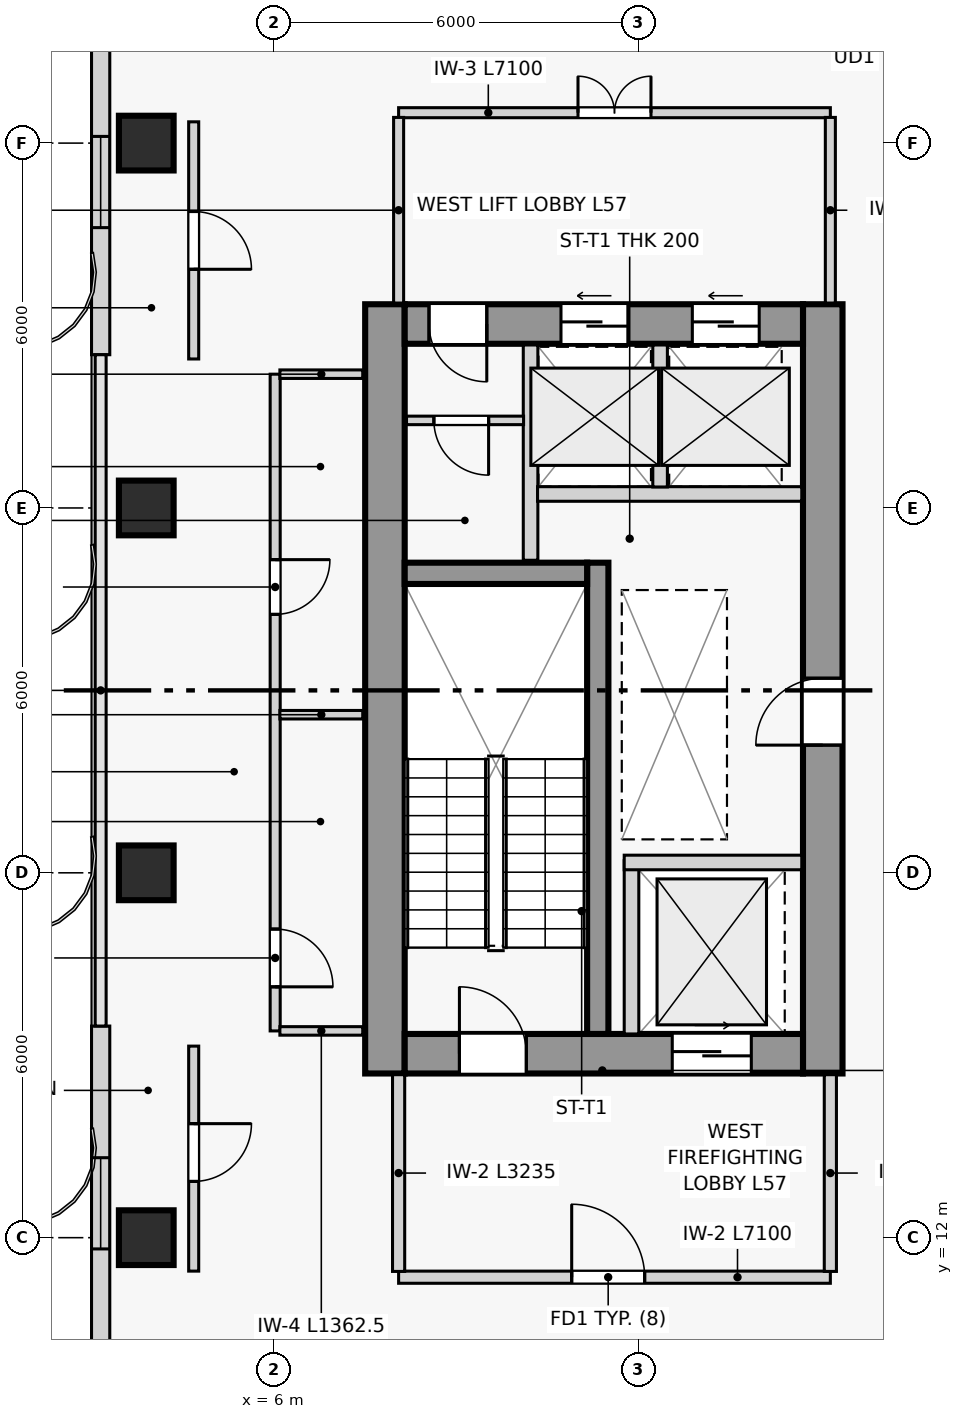
"""IFC4 building model, lengths in metres.
Left out: names, types, materials, properties, quantities, classifications, styles, units other than length and angle.
Written with IfcOpenShell. Run it as: python <this file> out.ifc"""

import sys

from ifc_helpers import new_model, si_unit, direction, frame, frame_2d, origin, origin_2d, place, context, subcontext, project, spatial, rectangle, extrude, source, transform, mapped, element, fill, save


model = new_model("IFC4")
c1 = context("Model", 3, precision=1e-05, world=origin(), true_north=direction((0.0, 1.0)))
c2 = subcontext(c1, "Body", "Model", "MODEL_VIEW")
j1 = project(units=[si_unit("LENGTHUNIT", "METRE"), si_unit("PLANEANGLEUNIT", "RADIAN")], contexts=[c1])
p1 = place(None, origin())
s1 = spatial("IfcSite", under=j1, at=p1, CompositionType="ELEMENT")
p2 = place(p1, origin())
s2 = spatial("IfcBuilding", under=s1, at=p2, CompositionType="ELEMENT")
p3 = place(p2, frame((0.0, 0.0, 216.9)))
s3 = spatial("IfcBuildingStorey", under=s2, at=p3, CompositionType="ELEMENT", Elevation=216.9)
p4 = place(p3, frame((7.825, 14.7, 0.0), z_axis=(0.0, 0.0, 1.0), x_axis=(0.0, 1.0, 0.0)))
e1 = element("IfcWall", 1, at=p4, inside=s3, PredefinedType="SHEAR", context=c2, shape_type="SweptSolid", body=[
    extrude(rectangle(XDim=12.65, YDim=0.65, at=frame_2d((6.325, 0.0))), origin(), (0.0, 0.0, 1.0), 3.6),
])
p5 = place(p3, frame((15.025, 14.7, 0.0), z_axis=(0.0, 0.0, 1.0), x_axis=(0.0, 1.0, 0.0)))
e2 = element("IfcWall", 2, at=p5, inside=s3, PredefinedType="SHEAR", context=c2, shape_type="SweptSolid", body=[
    extrude(rectangle(XDim=12.65, YDim=0.65, at=frame_2d((6.325, 0.0))), origin(), (0.0, 0.0, 1.0), 3.6),
])
p6 = place(p5, frame((5.4, 0.0, 0.0)))
e3 = element("IfcOpeningElement", 3, at=p6, cuts=e2, PredefinedType="OPENING", context=c2, shape_type="SweptSolid", body=[
    extrude(rectangle(XDim=1.1, YDim=2.2, at=frame_2d((0.55, 1.1))), frame((0.0, 0.335, 0.0), z_axis=(0.0, -1.0, 0.0), x_axis=(1.0, 0.0, 0.0)), (0.0, 0.0, 1.0), 0.67),
])
p7 = place(p3, frame((8.15, 15.025, 0.0), z_axis=(0.0, 0.0, 1.0), x_axis=(1.0, 0.0, 0.0)))
e4 = element("IfcWall", 4, at=p7, inside=s3, PredefinedType="SHEAR", context=c2, shape_type="SweptSolid", body=[
    extrude(rectangle(XDim=6.55, YDim=0.65, at=frame_2d((3.275, 0.0))), origin(), (0.0, 0.0, 1.0), 3.6),
])
p8 = place(p7, frame((0.9, 0.0, 0.0)))
e5 = element("IfcOpeningElement", 5, at=p8, cuts=e4, PredefinedType="OPENING", context=c2, shape_type="SweptSolid", body=[
    extrude(rectangle(XDim=1.1, YDim=2.2, at=frame_2d((0.55, 1.1))), frame((0.0, 0.335, 0.0), z_axis=(0.0, -1.0, 0.0), x_axis=(1.0, 0.0, 0.0)), (0.0, 0.0, 1.0), 0.67),
])
p9 = place(p7, frame((4.4, 0.0, 0.0)))
e6 = element("IfcOpeningElement", 6, at=p9, cuts=e4, PredefinedType="OPENING", context=c2, shape_type="SweptSolid", body=[
    extrude(rectangle(XDim=1.3, YDim=2.2, at=frame_2d((0.65, 1.1))), frame((0.0, 0.335, 0.0), z_axis=(0.0, -1.0, 0.0), x_axis=(1.0, 0.0, 0.0)), (0.0, 0.0, 1.0), 0.67),
])
p10 = place(p3, frame((8.15, 27.025, 0.0), z_axis=(0.0, 0.0, 1.0), x_axis=(1.0, 0.0, 0.0)))
e7 = element("IfcWall", 7, at=p10, inside=s3, PredefinedType="SHEAR", context=c2, shape_type="SweptSolid", body=[
    extrude(rectangle(XDim=6.55, YDim=0.65, at=frame_2d((3.275, 0.0))), origin(), (0.0, 0.0, 1.0), 3.6),
])
p11 = place(p10, frame((0.4, 0.0, 0.0)))
e8 = element("IfcOpeningElement", 8, at=p11, cuts=e7, PredefinedType="OPENING", context=c2, shape_type="SweptSolid", body=[
    extrude(rectangle(XDim=0.95, YDim=2.1, at=frame_2d((0.475, 1.05))), frame((0.0, 0.335, 0.0), z_axis=(0.0, -1.0, 0.0), x_axis=(1.0, 0.0, 0.0)), (0.0, 0.0, 1.0), 0.67),
])
p12 = place(p10, frame((2.57, 0.0, 0.0)))
e9 = element("IfcOpeningElement", 9, at=p12, cuts=e7, PredefinedType="OPENING", context=c2, shape_type="SweptSolid", body=[
    extrude(rectangle(XDim=1.1, YDim=2.2, at=frame_2d((0.55, 1.1))), frame((0.0, 0.335, 0.0), z_axis=(0.0, -1.0, 0.0), x_axis=(1.0, 0.0, 0.0)), (0.0, 0.0, 1.0), 0.67),
])
p13 = place(p10, frame((4.73, 0.0, 0.0)))
e10 = element("IfcOpeningElement", 10, at=p13, cuts=e7, PredefinedType="OPENING", context=c2, shape_type="SweptSolid", body=[
    extrude(rectangle(XDim=1.1, YDim=2.2, at=frame_2d((0.55, 1.1))), frame((0.0, 0.335, 0.0), z_axis=(0.0, -1.0, 0.0), x_axis=(1.0, 0.0, 0.0)), (0.0, 0.0, 1.0), 0.67),
])
p14 = place(p3, frame((11.325, 15.35, 0.0), z_axis=(0.0, 0.0, 1.0), x_axis=(0.0, 1.0, 0.0)))
e11 = element("IfcWall", 11, at=p14, inside=s3, PredefinedType="SHEAR", context=c2, shape_type="SweptSolid", body=[
    extrude(rectangle(XDim=7.75, YDim=0.35, at=frame_2d((3.875, 0.0))), origin(), (0.0, 0.0, 1.0), 3.6),
])
p15 = place(p3, frame((8.15, 22.925, 0.0), z_axis=(0.0, 0.0, 1.0), x_axis=(1.0, 0.0, 0.0)))
e12 = element("IfcWall", 12, at=p15, inside=s3, PredefinedType="SHEAR", context=c2, shape_type="SweptSolid", body=[
    extrude(rectangle(XDim=3.0, YDim=0.35, at=frame_2d((1.5, 0.0))), origin(), (0.0, 0.0, 1.0), 3.6),
])
m1 = source(origin(), c2, "Body", "SweptSolid", [
    extrude(rectangle(XDim=0.9, YDim=0.9, at=origin_2d()), origin(), (0.0, 0.0, 1.0), 3.6),
])
for number, where, z_axis, x_axis in (
    (13, (3.9, 12.0, 0.0), (0.0, 0.0, 1.0), (1.0, 0.0, 0.0)),
    (14, (3.9, 18.0, 0.0), (0.0, 0.0, 1.0), (1.0, 0.0, 0.0)),
    (15, (3.9, 24.0, 0.0), (0.0, 0.0, 1.0), (1.0, 0.0, 0.0)),
    (16, (3.9, 30.0, 0.0), (0.0, 0.0, 1.0), (1.0, 0.0, 0.0)),
):
    element("IfcColumn", number, at=place(p3, frame(where, z_axis=z_axis, x_axis=x_axis)), inside=s3, PredefinedType="COLUMN", context=c2, shape_type="MappedRepresentation", body=[
        mapped(m1, transform((0.0, 0.0, 0.0), scale=1.0)),
    ])
p16 = place(p3, frame((3.15, 38.25, 0.0), z_axis=(0.0, 0.0, 1.0), x_axis=(0.0, -1.0, 0.0)))
e17 = element("IfcWall", 17, at=p16, inside=s3, PredefinedType="SOLIDWALL", context=c2, shape_type="SweptSolid", body=[
    extrude(rectangle(XDim=11.73, YDim=0.3, at=frame_2d((5.865, 0.0))), origin(), (0.0, 0.0, 1.0), 3.28),
])
p17 = place(p16, frame((2.375, 0.0, 0.85)))
e18 = element("IfcOpeningElement", 18, at=p17, cuts=e17, PredefinedType="OPENING", context=c2, shape_type="SweptSolid", body=[
    extrude(rectangle(XDim=1.5, YDim=1.8, at=frame_2d((0.75, 0.9))), frame((0.0, 0.16, 0.0), z_axis=(0.0, -1.0, 0.0), x_axis=(1.0, 0.0, 0.0)), (0.0, 0.0, 1.0), 0.32),
])
p18 = place(p16, frame((8.14, 0.0, 0.85)))
e19 = element("IfcOpeningElement", 19, at=p18, cuts=e17, PredefinedType="OPENING", context=c2, shape_type="SweptSolid", body=[
    extrude(rectangle(XDim=1.5, YDim=1.8, at=frame_2d((0.75, 0.9))), frame((0.0, 0.16, 0.0), z_axis=(0.0, -1.0, 0.0), x_axis=(1.0, 0.0, 0.0)), (0.0, 0.0, 1.0), 0.32),
])
p19 = place(p3, frame((3.15, 15.48, 0.0), z_axis=(0.0, 0.0, 1.0), x_axis=(0.0, -1.0, 0.0)))
e20 = element("IfcWall", 20, at=p19, inside=s3, PredefinedType="SOLIDWALL", context=c2, shape_type="SweptSolid", body=[
    extrude(rectangle(XDim=11.73, YDim=0.3, at=frame_2d((5.865, 0.0))), origin(), (0.0, 0.0, 1.0), 3.28),
])
p20 = place(p19, frame((2.165, 0.0, 0.85)))
e21 = element("IfcOpeningElement", 21, at=p20, cuts=e20, PredefinedType="OPENING", context=c2, shape_type="SweptSolid", body=[
    extrude(rectangle(XDim=1.5, YDim=1.8, at=frame_2d((0.75, 0.9))), frame((0.0, 0.16, 0.0), z_axis=(0.0, -1.0, 0.0), x_axis=(1.0, 0.0, 0.0)), (0.0, 0.0, 1.0), 0.32),
])
p21 = place(p19, frame((7.93, 0.0, 0.85)))
e22 = element("IfcOpeningElement", 22, at=p21, cuts=e20, PredefinedType="OPENING", context=c2, shape_type="SweptSolid", body=[
    extrude(rectangle(XDim=1.5, YDim=1.8, at=frame_2d((0.75, 0.9))), frame((0.0, 0.16, 0.0), z_axis=(0.0, -1.0, 0.0), x_axis=(1.0, 0.0, 0.0)), (0.0, 0.0, 1.0), 0.32),
])
p22 = place(p3, frame((11.88, 15.35, 0.0), z_axis=(0.0, 0.0, 1.0), x_axis=(0.0, 1.0, 0.0)))
e23 = element("IfcWall", 23, at=p22, inside=s3, PredefinedType="PARTITIONING", context=c2, shape_type="SweptSolid", body=[
    extrude(rectangle(XDim=2.85, YDim=0.24, at=frame_2d((1.425, 0.0))), origin(), (0.0, 0.0, 1.0), 3.28),
])
p23 = place(p3, frame((11.76, 18.17, 0.0), z_axis=(0.0, 0.0, 1.0), x_axis=(1.0, 0.0, 0.0)))
e24 = element("IfcWall", 24, at=p23, inside=s3, PredefinedType="PARTITIONING", context=c2, shape_type="SweptSolid", body=[
    extrude(rectangle(XDim=2.92, YDim=0.24, at=frame_2d((1.46, 0.0))), origin(), (0.0, 0.0, 1.0), 3.28),
])
p24 = place(p3, frame((8.05, 11.35, 0.0), z_axis=(0.0, 0.0, 1.0), x_axis=(1.0, 0.0, 0.0)))
e25 = element("IfcWall", 25, at=p24, inside=s3, PredefinedType="PARTITIONING", context=c2, shape_type="SweptSolid", body=[
    extrude(rectangle(XDim=7.1, YDim=0.2, at=frame_2d((3.55, 0.0))), origin(), (0.0, 0.0, 1.0), 3.28),
])
p25 = place(p24, frame((2.846, 0.0, 0.0)))
e26 = element("IfcOpeningElement", 26, at=p25, cuts=e25, PredefinedType="OPENING", context=c2, shape_type="SweptSolid", body=[
    extrude(rectangle(XDim=1.2, YDim=2.2, at=frame_2d((0.6, 1.1))), frame((0.0, 0.11, 0.0), z_axis=(0.0, -1.0, 0.0), x_axis=(1.0, 0.0, 0.0)), (0.0, 0.0, 1.0), 0.22),
])
for number, where, z_axis, x_axis in (
    (27, (8.05, 11.445, 0.0), (0.0, 0.0, 1.0), (0.0, 1.0, 0.0)),
    (28, (15.15, 11.445, 0.0), (0.0, 0.0, 1.0), (0.0, 1.0, 0.0)),
):
    element("IfcWall", number, at=place(p3, frame(where, z_axis=z_axis, x_axis=x_axis)), inside=s3, PredefinedType="PARTITIONING", context=c2, shape_type="SweptSolid", body=[
        extrude(rectangle(XDim=3.235, YDim=0.2, at=frame_2d((1.617, 0.0))), origin(), (0.0, 0.0, 1.0), 3.28),
    ])
p26 = place(p3, frame((10.22, 23.14, 0.0), z_axis=(0.0, 0.0, 1.0), x_axis=(0.0, 1.0, 0.0)))
e29 = element("IfcWall", 29, at=p26, inside=s3, PredefinedType="PARTITIONING", context=c2, shape_type="SweptSolid", body=[
    extrude(rectangle(XDim=3.54, YDim=0.24, at=frame_2d((1.77, 0.0))), origin(), (0.0, 0.0, 1.0), 3.28),
])
p27 = place(p3, frame((10.335, 24.23, 0.0), z_axis=(0.0, 0.0, 1.0), x_axis=(1.0, 0.0, 0.0)))
e30 = element("IfcWall", 30, at=p27, inside=s3, PredefinedType="PARTITIONING", context=c2, shape_type="SweptSolid", body=[
    extrude(rectangle(XDim=4.345, YDim=0.24, at=frame_2d((2.172, 0.0))), origin(), (0.0, 0.0, 1.0), 3.28),
])
p28 = place(p3, frame((12.35, 24.345, 0.0), z_axis=(0.0, 0.0, 1.0), x_axis=(0.0, 1.0, 0.0)))
e31 = element("IfcWall", 31, at=p28, inside=s3, PredefinedType="PARTITIONING", context=c2, shape_type="SweptSolid", body=[
    extrude(rectangle(XDim=2.335, YDim=0.24, at=frame_2d((1.167, 0.0))), origin(), (0.0, 0.0, 1.0), 3.28),
])
p29 = place(p3, frame((8.18, 25.44, 0.0), z_axis=(0.0, 0.0, 1.0), x_axis=(1.0, 0.0, 0.0)))
e32 = element("IfcWall", 32, at=p29, inside=s3, PredefinedType="PARTITIONING", context=c2, shape_type="SweptSolid", body=[
    extrude(rectangle(XDim=1.925, YDim=0.14, at=frame_2d((0.962, 0.0))), origin(), (0.0, 0.0, 1.0), 3.28),
])
p30 = place(p29, frame((0.45, 0.0, 0.0)))
e33 = element("IfcOpeningElement", 33, at=p30, cuts=e32, PredefinedType="OPENING", context=c2, shape_type="SweptSolid", body=[
    extrude(rectangle(XDim=0.9, YDim=2.1, at=frame_2d((0.45, 1.05))), frame((0.0, 0.08, 0.0), z_axis=(0.0, -1.0, 0.0), x_axis=(1.0, 0.0, 0.0)), (0.0, 0.0, 1.0), 0.16),
])
p31 = place(p3, frame((8.05, 30.5, 0.0), z_axis=(0.0, 0.0, 1.0), x_axis=(1.0, 0.0, 0.0)))
e34 = element("IfcWall", 34, at=p31, inside=s3, PredefinedType="PARTITIONING", context=c2, shape_type="SweptSolid", body=[
    extrude(rectangle(XDim=7.1, YDim=0.165, at=frame_2d((3.55, 0.0))), origin(), (0.0, 0.0, 1.0), 3.28),
])
p32 = place(p31, frame((2.95, 0.0, 0.0)))
e35 = element("IfcOpeningElement", 35, at=p32, cuts=e34, PredefinedType="OPENING", context=c2, shape_type="SweptSolid", body=[
    extrude(rectangle(XDim=1.2, YDim=2.2, at=frame_2d((0.6, 1.1))), frame((0.0, 0.093, 0.0), z_axis=(0.0, -1.0, 0.0), x_axis=(1.0, 0.0, 0.0)), (0.0, 0.0, 1.0), 0.185),
])
for number, where, z_axis, x_axis in (
    (36, (8.05, 27.37, 0.0), (0.0, 0.0, 1.0), (0.0, 1.0, 0.0)),
    (37, (15.15, 27.37, 0.0), (0.0, 0.0, 1.0), (0.0, 1.0, 0.0)),
):
    element("IfcWall", number, at=place(p3, frame(where, z_axis=z_axis, x_axis=x_axis)), inside=s3, PredefinedType="PARTITIONING", context=c2, shape_type="SweptSolid", body=[
        extrude(rectangle(XDim=3.052, YDim=0.165, at=frame_2d((1.526, 0.0))), origin(), (0.0, 0.0, 1.0), 3.28),
    ])
p33 = place(p3, frame((6.02, 15.4, 0.0), z_axis=(0.0, 0.0, 1.0), x_axis=(0.0, 1.0, 0.0)))
e38 = element("IfcWall", 38, at=p33, inside=s3, PredefinedType="PARTITIONING", context=c2, shape_type="SweptSolid", body=[
    extrude(rectangle(XDim=10.8, YDim=0.165, at=frame_2d((5.4, 0.0))), origin(), (0.0, 0.0, 1.0), 3.28),
])
p34 = place(p33, frame((0.725, 0.0, 0.0)))
e39 = element("IfcOpeningElement", 39, at=p34, cuts=e38, PredefinedType="OPENING", context=c2, shape_type="SweptSolid", body=[
    extrude(rectangle(XDim=0.95, YDim=2.1, at=frame_2d((0.475, 1.05))), frame((0.0, 0.093, 0.0), z_axis=(0.0, -1.0, 0.0), x_axis=(1.0, 0.0, 0.0)), (0.0, 0.0, 1.0), 0.185),
])
p35 = place(p33, frame((6.85, 0.0, 0.0)))
e40 = element("IfcOpeningElement", 40, at=p35, cuts=e38, PredefinedType="OPENING", context=c2, shape_type="SweptSolid", body=[
    extrude(rectangle(XDim=0.9, YDim=2.1, at=frame_2d((0.45, 1.05))), frame((0.0, 0.093, 0.0), z_axis=(0.0, -1.0, 0.0), x_axis=(1.0, 0.0, 0.0)), (0.0, 0.0, 1.0), 0.185),
])
for number, where, z_axis, x_axis in (
    (41, (6.097, 15.4, 0.0), (0.0, 0.0, 1.0), (1.0, 0.0, 0.0)),
    (42, (6.097, 26.2, 0.0), (0.0, 0.0, 1.0), (1.0, 0.0, 0.0)),
):
    element("IfcWall", number, at=place(p3, frame(where, z_axis=z_axis, x_axis=x_axis)), inside=s3, PredefinedType="PARTITIONING", context=c2, shape_type="SweptSolid", body=[
        extrude(rectangle(XDim=1.363, YDim=0.14, at=frame_2d((0.681, 0.0))), origin(), (0.0, 0.0, 1.0), 3.28),
    ])
p36 = place(p3, frame((6.097, 20.6, 0.0), z_axis=(0.0, 0.0, 1.0), x_axis=(1.0, 0.0, 0.0)))
e43 = element("IfcWall", 43, at=p36, inside=s3, PredefinedType="PLUMBINGWALL", context=c2, shape_type="SweptSolid", body=[
    extrude(rectangle(XDim=1.363, YDim=0.14, at=frame_2d((0.681, 0.0))), origin(), (0.0, 0.0, 1.0), 3.28),
])
p37 = place(p3, frame((4.68, 11.45, 0.0), z_axis=(0.0, 0.0, 1.0), x_axis=(0.0, 1.0, 0.0)))
e44 = element("IfcWall", 44, at=p37, inside=s3, PredefinedType="PARTITIONING", context=c2, shape_type="SweptSolid", body=[
    extrude(rectangle(XDim=3.7, YDim=0.165, at=frame_2d((1.85, 0.0))), origin(), (0.0, 0.0, 1.0), 3.28),
])
p38 = place(p37, frame((1.475, 0.0, 0.0)))
e45 = element("IfcOpeningElement", 45, at=p38, cuts=e44, PredefinedType="OPENING", context=c2, shape_type="SweptSolid", body=[
    extrude(rectangle(XDim=0.95, YDim=2.1, at=frame_2d((0.475, 1.05))), frame((0.0, 0.093, 0.0), z_axis=(0.0, -1.0, 0.0), x_axis=(1.0, 0.0, 0.0)), (0.0, 0.0, 1.0), 0.185),
])
p39 = place(p3, frame((4.68, 26.45, 0.0), z_axis=(0.0, 0.0, 1.0), x_axis=(0.0, 1.0, 0.0)))
e46 = element("IfcWall", 46, at=p39, inside=s3, PredefinedType="PARTITIONING", context=c2, shape_type="SweptSolid", body=[
    extrude(rectangle(XDim=3.9, YDim=0.165, at=frame_2d((1.95, 0.0))), origin(), (0.0, 0.0, 1.0), 3.28),
])
p40 = place(p39, frame((1.475, 0.0, 0.0)))
e47 = element("IfcOpeningElement", 47, at=p40, cuts=e46, PredefinedType="OPENING", context=c2, shape_type="SweptSolid", body=[
    extrude(rectangle(XDim=0.95, YDim=2.1, at=frame_2d((0.475, 1.05))), frame((0.0, 0.093, 0.0), z_axis=(0.0, -1.0, 0.0), x_axis=(1.0, 0.0, 0.0)), (0.0, 0.0, 1.0), 0.185),
])
m2 = source(origin(), c2, "Body", "SweptSolid", [
    extrude(rectangle(XDim=1.5, YDim=1.8, at=frame_2d((0.75, 0.9))), frame((0.0, 0.03, 0.0), z_axis=(0.0, -1.0, 0.0), x_axis=(1.0, 0.0, 0.0)), (0.0, 0.0, 1.0), 0.06),
])
p41 = place(p18, origin())
e48 = element("IfcWindow", 48, at=p41, inside=s3, PartitioningType="SINGLE_PANEL", PredefinedType="WINDOW", context=c2, shape_type="MappedRepresentation", body=[
    mapped(m2, transform((0.0, 0.0, 0.0), scale=1.0)),
])
fill(e19, e48)
p42 = place(p20, origin())
e49 = element("IfcWindow", 49, at=p42, inside=s3, PartitioningType="SINGLE_PANEL", PredefinedType="WINDOW", context=c2, shape_type="MappedRepresentation", body=[
    mapped(m2, transform((0.0, 0.0, 0.0), scale=1.0)),
])
fill(e21, e49)
m3 = source(origin(), c2, "Body", "SweptSolid", [
    extrude(rectangle(XDim=1.1, YDim=2.2, at=frame_2d((0.55, 1.1))), frame((0.0, 0.025, 0.0), z_axis=(0.0, -1.0, 0.0), x_axis=(1.0, 0.0, 0.0)), (0.0, 0.0, 1.0), 0.05),
])
p43 = place(p8, origin())
e50 = element("IfcDoor", 50, at=p43, inside=s3, OperationType="SINGLE_SWING_LEFT", PredefinedType="DOOR", context=c2, shape_type="MappedRepresentation", body=[
    mapped(m3, transform((0.0, 0.0, 0.0), scale=1.0)),
])
fill(e5, e50)
m4 = source(origin(), c2, "Body", "SweptSolid", [
    extrude(rectangle(XDim=1.3, YDim=2.2, at=frame_2d((0.65, 1.1))), frame((0.0, 0.025, 0.0), z_axis=(0.0, -1.0, 0.0), x_axis=(1.0, 0.0, 0.0)), (0.0, 0.0, 1.0), 0.05),
])
p44 = place(p9, origin())
e51 = element("IfcDoor", 51, at=p44, inside=s3, OperationType="SLIDING_TO_RIGHT", PredefinedType="DOOR", context=c2, shape_type="MappedRepresentation", body=[
    mapped(m4, transform((0.0, 0.0, 0.0), scale=1.0)),
])
fill(e6, e51)
m5 = source(origin(), c2, "Body", "SweptSolid", [
    extrude(rectangle(XDim=1.2, YDim=2.2, at=frame_2d((0.6, 1.1))), frame((0.0, 0.025, 0.0), z_axis=(0.0, -1.0, 0.0), x_axis=(1.0, 0.0, 0.0)), (0.0, 0.0, 1.0), 0.05),
])
p45 = place(p25, origin())
e52 = element("IfcDoor", 52, at=p45, inside=s3, OperationType="SINGLE_SWING_LEFT", PredefinedType="DOOR", context=c2, shape_type="MappedRepresentation", body=[
    mapped(m5, transform((0.0, 0.0, 0.0), scale=1.0)),
])
fill(e26, e52)
m6 = source(origin(), c2, "Body", "SweptSolid", [
    extrude(rectangle(XDim=0.95, YDim=2.1, at=frame_2d((0.475, 1.05))), frame((0.0, 0.025, 0.0), z_axis=(0.0, -1.0, 0.0), x_axis=(1.0, 0.0, 0.0)), (0.0, 0.0, 1.0), 0.05),
])
p46 = place(p11, frame((0.95, 0.0, 0.0), z_axis=(0.0, 0.0, 1.0), x_axis=(-1.0, 0.0, 0.0)))
e53 = element("IfcDoor", 53, at=p46, inside=s3, OperationType="SINGLE_SWING_LEFT", PredefinedType="DOOR", context=c2, shape_type="MappedRepresentation", body=[
    mapped(m6, transform((0.0, 0.0, 0.0), scale=1.0)),
])
fill(e8, e53)
m7 = source(origin(), c2, "Body", "SweptSolid", [
    extrude(rectangle(XDim=0.9, YDim=2.1, at=frame_2d((0.45, 1.05))), frame((0.0, 0.025, 0.0), z_axis=(0.0, -1.0, 0.0), x_axis=(1.0, 0.0, 0.0)), (0.0, 0.0, 1.0), 0.05),
])
p47 = place(p30, frame((0.9, 0.0, 0.0), z_axis=(0.0, 0.0, 1.0), x_axis=(-1.0, 0.0, 0.0)))
e54 = element("IfcDoor", 54, at=p47, inside=s3, OperationType="SINGLE_SWING_LEFT", PredefinedType="DOOR", context=c2, shape_type="MappedRepresentation", body=[
    mapped(m7, transform((0.0, 0.0, 0.0), scale=1.0)),
])
fill(e33, e54)
m8 = source(origin(), c2, "Body", "SweptSolid", [
    extrude(rectangle(XDim=1.1, YDim=2.2, at=frame_2d((0.55, 1.1))), frame((0.0, 0.025, 0.0), z_axis=(0.0, -1.0, 0.0), x_axis=(1.0, 0.0, 0.0)), (0.0, 0.0, 1.0), 0.05),
])
p48 = place(p12, origin())
e55 = element("IfcDoor", 55, at=p48, inside=s3, OperationType="SLIDING_TO_LEFT", PredefinedType="DOOR", context=c2, shape_type="MappedRepresentation", body=[
    mapped(m8, transform((0.0, 0.0, 0.0), scale=1.0)),
])
fill(e9, e55)
p49 = place(p13, origin())
e56 = element("IfcDoor", 56, at=p49, inside=s3, OperationType="SLIDING_TO_LEFT", PredefinedType="DOOR", context=c2, shape_type="MappedRepresentation", body=[
    mapped(m8, transform((0.0, 0.0, 0.0), scale=1.0)),
])
fill(e10, e56)
p50 = place(p32, origin())
e57 = element("IfcDoor", 57, at=p50, inside=s3, OperationType="DOUBLE_DOOR_SINGLE_SWING", PredefinedType="DOOR", context=c2, shape_type="MappedRepresentation", body=[
    mapped(m5, transform((0.0, 0.0, 0.0), scale=1.0)),
])
fill(e35, e57)
p51 = place(p6, origin())
e58 = element("IfcDoor", 58, at=p51, inside=s3, OperationType="SINGLE_SWING_LEFT", PredefinedType="DOOR", context=c2, shape_type="MappedRepresentation", body=[
    mapped(m3, transform((0.0, 0.0, 0.0), scale=1.0)),
])
fill(e3, e58)
p52 = place(p34, frame((0.95, 0.0, 0.0), z_axis=(0.0, 0.0, 1.0), x_axis=(-1.0, 0.0, 0.0)))
e59 = element("IfcDoor", 59, at=p52, inside=s3, OperationType="SINGLE_SWING_RIGHT", PredefinedType="DOOR", context=c2, shape_type="MappedRepresentation", body=[
    mapped(m6, transform((0.0, 0.0, 0.0), scale=1.0)),
])
fill(e39, e59)
p53 = place(p35, frame((0.9, 0.0, 0.0), z_axis=(0.0, 0.0, 1.0), x_axis=(-1.0, 0.0, 0.0)))
e60 = element("IfcDoor", 60, at=p53, inside=s3, OperationType="SINGLE_SWING_LEFT", PredefinedType="DOOR", context=c2, shape_type="MappedRepresentation", body=[
    mapped(m7, transform((0.0, 0.0, 0.0), scale=1.0)),
])
fill(e40, e60)
p54 = place(p38, frame((0.95, 0.0, 0.0), z_axis=(0.0, 0.0, 1.0), x_axis=(-1.0, 0.0, 0.0)))
e61 = element("IfcDoor", 61, at=p54, inside=s3, OperationType="SINGLE_SWING_LEFT", PredefinedType="DOOR", context=c2, shape_type="MappedRepresentation", body=[
    mapped(m6, transform((0.0, 0.0, 0.0), scale=1.0)),
])
fill(e45, e61)
p55 = place(p40, frame((0.95, 0.0, 0.0), z_axis=(0.0, 0.0, 1.0), x_axis=(-1.0, 0.0, 0.0)))
e62 = element("IfcDoor", 62, at=p55, inside=s3, OperationType="SINGLE_SWING_RIGHT", PredefinedType="DOOR", context=c2, shape_type="MappedRepresentation", body=[
    mapped(m6, transform((0.0, 0.0, 0.0), scale=1.0)),
])
fill(e47, e62)
save(model, sys.argv[1])
